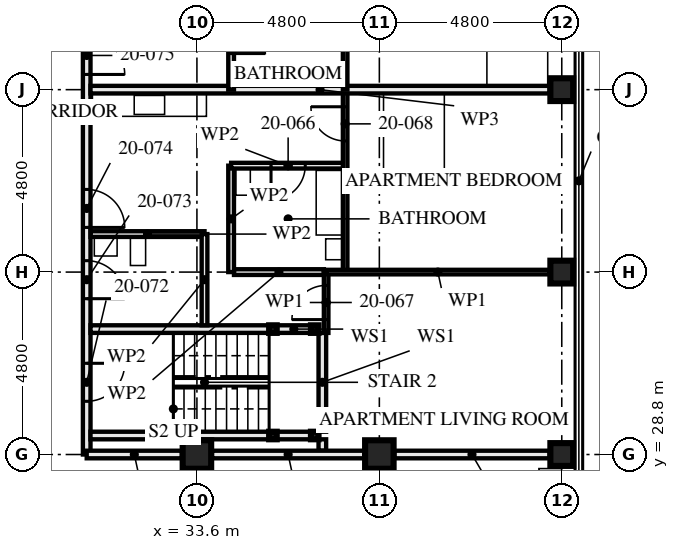
"""IFC4 building model, lengths in metres.
Left out: names, types, materials, properties, quantities, classifications, styles, units other than length and angle.
Written with IfcOpenShell. Run it as: python <this file> out.ifc"""

import sys

from ifc_helpers import new_model, si_unit, direction, frame, frame_2d, origin, origin_2d, place, context, subcontext, project, spatial, rectangle, hollow_rectangle, extrude, element, fill, save


model = new_model("IFC4")
c1 = context("Model", 3, precision=1e-05, world=origin(), true_north=direction((0.0, 1.0)))
c2 = subcontext(c1, "Body", "Model", "MODEL_VIEW")
j1 = project(units=[si_unit("LENGTHUNIT", "METRE"), si_unit("PLANEANGLEUNIT", "RADIAN")], contexts=[c1])
p1 = place(None, origin())
s1 = spatial("IfcSite", under=j1, at=p1, CompositionType="ELEMENT")
p2 = place(p1, origin())
s2 = spatial("IfcBuilding", under=s1, at=p2, CompositionType="ELEMENT")
p3 = place(p2, frame((0.0, 0.0, 76.0)))
s3 = spatial("IfcBuildingStorey", under=s2, at=p3, CompositionType="ELEMENT", Elevation=76.0)
for number, where, z_axis, x_axis in (
    (1, (33.6, 28.8, 0.0), (0.0, 0.0, 1.0), (0.0, 1.0, 0.0)),
    (2, (38.4, 28.8, 0.0), (0.0, 0.0, 1.0), (0.0, 1.0, 0.0)),
):
    element("IfcColumn", number, at=place(p3, frame(where, z_axis=z_axis, x_axis=x_axis)), inside=s3, PredefinedType="COLUMN", context=c2, shape_type="SweptSolid", body=[
        extrude(hollow_rectangle(XDim=0.75, YDim=0.75, WallThickness=0.08, at=origin_2d()), origin(), (0.0, 0.0, 1.0), 3.5),
    ])
for number, where, z_axis, x_axis in (
    (3, (43.2, 28.8, 0.0), (0.0, 0.0, 1.0), (0.0, 1.0, 0.0)),
    (4, (43.2, 33.6, 0.0), (0.0, 0.0, 1.0), (1.0, 0.0, 0.0)),
    (5, (43.2, 38.4, 0.0), (0.0, 0.0, 1.0), (1.0, 0.0, 0.0)),
):
    element("IfcColumn", number, at=place(p3, frame(where, z_axis=z_axis, x_axis=x_axis)), inside=s3, PredefinedType="COLUMN", context=c2, shape_type="SweptSolid", body=[
        extrude(hollow_rectangle(XDim=0.6, YDim=0.6, WallThickness=0.08, at=origin_2d()), origin(), (0.0, 0.0, 1.0), 3.5),
    ])
for number, where, z_axis, x_axis in (
    (6, (36.7, 29.3, 0.0), (0.0, 0.0, 1.0), (1.0, 0.0, 0.0)),
    (7, (36.7, 32.1, 0.0), (0.0, 0.0, 1.0), (1.0, 0.0, 0.0)),
    (8, (35.6, 29.3, 0.0), (0.0, 0.0, 1.0), (1.0, 0.0, 0.0)),
    (9, (35.6, 32.1, 0.0), (0.0, 0.0, 1.0), (1.0, 0.0, 0.0)),
):
    element("IfcColumn", number, at=place(p3, frame(where, z_axis=z_axis, x_axis=x_axis)), inside=s3, PredefinedType="COLUMN", context=c2, shape_type="SweptSolid", body=[
        extrude(hollow_rectangle(XDim=0.2, YDim=0.2, WallThickness=0.008, at=origin_2d()), origin(), (0.0, 0.0, 1.0), 3.25),
    ])
p4 = place(p3, frame((38.4, 26.8, 0.0), z_axis=(0.0, 0.0, 1.0), x_axis=(0.0, 1.0, 0.0)))
e10 = element("IfcWall", 10, at=p4, inside=s3, PredefinedType="PARTITIONING", context=c2, shape_type="SweptSolid", body=[
    extrude(rectangle(XDim=1.605, YDim=0.2, at=frame_2d((0.802, 0.0))), origin(), (0.0, 0.0, 1.0), 3.25),
])
p5 = place(p4, frame((0.55, 0.0, 0.0)))
e11 = element("IfcOpeningElement", 11, at=p5, cuts=e10, PredefinedType="OPENING", context=c2, shape_type="SweptSolid", body=[
    extrude(rectangle(XDim=1.0, YDim=2.1, at=frame_2d((0.5, 1.05))), frame((0.0, 0.111, 0.0), z_axis=(0.0, -1.0, 0.0), x_axis=(1.0, 0.0, 0.0)), (0.0, 0.0, 1.0), 0.221),
])
p6 = place(p3, frame((36.6, 29.3, 0.0), z_axis=(0.0, 0.0, 1.0), x_axis=(-1.0, 0.0, 0.0)))
e12 = element("IfcWall", 12, at=p6, inside=s3, PredefinedType="SOLIDWALL", context=c2, shape_type="SweptSolid", body=[
    extrude(rectangle(XDim=0.9, YDim=0.2, at=frame_2d((0.45, 0.0))), origin(), (0.0, 0.0, 1.0), 2.94),
])
p7 = place(p3, frame((35.5, 29.3, 0.0), z_axis=(0.0, 0.0, 1.0), x_axis=(-1.0, 0.0, 0.0)))
e13 = element("IfcWall", 13, at=p7, inside=s3, PredefinedType="SOLIDWALL", context=c2, shape_type="SweptSolid", body=[
    extrude(rectangle(XDim=4.7, YDim=0.2, at=frame_2d((2.35, 0.0))), origin(), (0.0, 0.0, 1.0), 2.94),
])
p8 = place(p3, frame((36.6, 32.1, 0.0), z_axis=(0.0, 0.0, 1.0), x_axis=(-1.0, 0.0, 0.0)))
e14 = element("IfcWall", 14, at=p8, inside=s3, PredefinedType="SOLIDWALL", context=c2, shape_type="SweptSolid", body=[
    extrude(rectangle(XDim=0.9, YDim=0.2, at=frame_2d((0.45, 0.0))), origin(), (0.0, 0.0, 1.0), 2.94),
])
p9 = place(p3, frame((35.5, 32.1, 0.0), z_axis=(0.0, 0.0, 1.0), x_axis=(-1.0, 0.0, 0.0)))
e15 = element("IfcWall", 15, at=p9, inside=s3, PredefinedType="SOLIDWALL", context=c2, shape_type="SweptSolid", body=[
    extrude(rectangle(XDim=4.7, YDim=0.2, at=frame_2d((2.35, 0.0))), origin(), (0.0, 0.0, 1.0), 2.94),
])
p10 = place(p3, frame((36.9, 28.9, 0.0), z_axis=(0.0, 0.0, 1.0), x_axis=(0.0, 1.0, 0.0)))
e16 = element("IfcWall", 16, at=p10, inside=s3, PredefinedType="SOLIDWALL", context=c2, shape_type="SweptSolid", body=[
    extrude(rectangle(XDim=0.3, YDim=0.2, at=frame_2d((0.15, 0.0))), origin(), (0.0, 0.0, 1.0), 3.25),
])
p11 = place(p3, frame((36.9, 29.4, 0.0), z_axis=(0.0, 0.0, 1.0), x_axis=(0.0, 1.0, 0.0)))
e17 = element("IfcWall", 17, at=p11, inside=s3, PredefinedType="SOLIDWALL", context=c2, shape_type="SweptSolid", body=[
    extrude(rectangle(XDim=2.6, YDim=0.2, at=frame_2d((1.3, 0.0))), origin(), (0.0, 0.0, 1.0), 3.25),
])
p12 = place(p3, frame((33.8, 32.2, 0.0), z_axis=(0.0, 0.0, 1.0), x_axis=(0.0, 1.0, 0.0)))
e18 = element("IfcWall", 18, at=p12, inside=s3, PredefinedType="PARTITIONING", context=c2, shape_type="SweptSolid", body=[
    extrude(rectangle(XDim=2.4, YDim=0.15, at=frame_2d((1.2, 0.0))), origin(), (0.0, 0.0, 1.0), 2.04),
])
p13 = place(p3, frame((33.8, 34.6, 0.0), z_axis=(0.0, 0.0, 1.0), x_axis=(-1.0, 0.0, 0.0)))
e19 = element("IfcWall", 19, at=p13, inside=s3, PredefinedType="PARTITIONING", context=c2, shape_type="SweptSolid", body=[
    extrude(rectangle(XDim=3.0, YDim=0.15, at=frame_2d((1.5, 0.0))), origin(), (0.0, 0.0, 1.0), 3.25),
])
p14 = place(p3, frame((37.5, 36.4, 0.0), z_axis=(0.0, 0.0, 1.0), x_axis=(-1.0, 0.0, 0.0)))
e20 = element("IfcWall", 20, at=p14, inside=s3, PredefinedType="PARTITIONING", context=c2, shape_type="SweptSolid", body=[
    extrude(rectangle(XDim=3.0, YDim=0.15, at=frame_2d((1.5, 0.0))), origin(), (0.0, 0.0, 1.0), 3.25),
])
p15 = place(p14, frame((1.05, 0.0, 0.0)))
e21 = element("IfcOpeningElement", 21, at=p15, cuts=e20, PredefinedType="OPENING", context=c2, shape_type="SweptSolid", body=[
    extrude(rectangle(XDim=0.9, YDim=2.1, at=frame_2d((0.45, 1.05))), frame((0.0, 0.085, 0.0), z_axis=(0.0, -1.0, 0.0), x_axis=(1.0, 0.0, 0.0)), (0.0, 0.0, 1.0), 0.171),
])
p16 = place(p3, frame((34.5, 33.6, 0.0), z_axis=(0.0, 0.0, 1.0), x_axis=(0.0, 1.0, 0.0)))
e22 = element("IfcWall", 22, at=p16, inside=s3, PredefinedType="PARTITIONING", context=c2, shape_type="SweptSolid", body=[
    extrude(rectangle(XDim=2.8, YDim=0.15, at=frame_2d((1.4, 0.0))), origin(), (0.0, 0.0, 1.0), 3.25),
])
p17 = place(p3, frame((37.0, 32.0, 0.0), z_axis=(0.0, 0.0, 1.0), x_axis=(0.0, 1.0, 0.0)))
e23 = element("IfcWall", 23, at=p17, inside=s3, PredefinedType="PARTITIONING", context=c2, shape_type="SweptSolid", body=[
    extrude(rectangle(XDim=1.6, YDim=0.12, at=frame_2d((0.8, 0.0))), origin(), (0.0, 0.0, 1.0), 3.25),
])
p18 = place(p17, frame((0.35, 0.0, 0.0)))
e24 = element("IfcOpeningElement", 24, at=p18, cuts=e23, PredefinedType="OPENING", context=c2, shape_type="SweptSolid", body=[
    extrude(rectangle(XDim=0.9, YDim=2.1, at=frame_2d((0.45, 1.05))), frame((0.0, 0.071, 0.0), z_axis=(0.0, -1.0, 0.0), x_axis=(1.0, 0.0, 0.0)), (0.0, 0.0, 1.0), 0.141),
])
p19 = place(p3, frame((37.5, 33.6, 0.0), z_axis=(0.0, 0.0, 1.0), x_axis=(0.0, 1.0, 0.0)))
e25 = element("IfcWall", 25, at=p19, inside=s3, PredefinedType="PARTITIONING", context=c2, shape_type="SweptSolid", body=[
    extrude(rectangle(XDim=4.8, YDim=0.12, at=frame_2d((2.4, 0.0))), origin(), (0.0, 0.0, 1.0), 3.25),
])
p20 = place(p19, frame((3.45, 0.0, 0.0)))
e26 = element("IfcOpeningElement", 26, at=p20, cuts=e25, PredefinedType="OPENING", context=c2, shape_type="SweptSolid", body=[
    extrude(rectangle(XDim=0.9, YDim=2.1, at=frame_2d((0.45, 1.05))), frame((0.0, 0.071, 0.0), z_axis=(0.0, -1.0, 0.0), x_axis=(1.0, 0.0, 0.0)), (0.0, 0.0, 1.0), 0.141),
])
p21 = place(p3, frame((42.88, 33.6, 0.0), z_axis=(0.0, 0.0, 1.0), x_axis=(-1.0, 0.0, 0.0)))
e27 = element("IfcWall", 27, at=p21, inside=s3, PredefinedType="PARTITIONING", context=c2, shape_type="SweptSolid", body=[
    extrude(rectangle(XDim=5.88, YDim=0.12, at=frame_2d((2.94, 0.0))), origin(), (0.0, 0.0, 1.0), 2.04),
])
p22 = place(p3, frame((42.88, 38.4, 0.0), z_axis=(0.0, 0.0, 1.0), x_axis=(-1.0, 0.0, 0.0)))
e28 = element("IfcWall", 28, at=p22, inside=s3, PredefinedType="PARTITIONING", context=c2, shape_type="SweptSolid", body=[
    extrude(rectangle(XDim=12.08, YDim=0.2, at=frame_2d((6.04, 0.0))), origin(), (0.0, 0.0, 1.0), 2.04),
])
p23 = place(p3, frame((34.5, 38.4, 0.0), z_axis=(0.0, 0.0, 1.0), x_axis=(0.0, 1.0, 0.0)))
e29 = element("IfcWall", 29, at=p23, inside=s3, PredefinedType="PARTITIONING", context=c2, shape_type="SweptSolid", body=[
    extrude(rectangle(XDim=2.8, YDim=0.15, at=frame_2d((1.4, 0.0))), origin(), (0.0, 0.0, 1.0), 3.25),
])
p24 = place(p23, frame((0.95, 0.0, 0.0)))
e30 = element("IfcOpeningElement", 30, at=p24, cuts=e29, PredefinedType="OPENING", context=c2, shape_type="SweptSolid", body=[
    extrude(rectangle(XDim=0.9, YDim=2.1, at=frame_2d((0.45, 1.05))), frame((0.0, 0.085, 0.0), z_axis=(0.0, -1.0, 0.0), x_axis=(1.0, 0.0, 0.0)), (0.0, 0.0, 1.0), 0.171),
])
p25 = place(p3, frame((37.5, 38.4, 0.0), z_axis=(0.0, 0.0, 1.0), x_axis=(0.0, 1.0, 0.0)))
e31 = element("IfcWall", 31, at=p25, inside=s3, PredefinedType="PARTITIONING", context=c2, shape_type="SweptSolid", body=[
    extrude(rectangle(XDim=4.8, YDim=0.12, at=frame_2d((2.4, 0.0))), origin(), (0.0, 0.0, 1.0), 3.25),
])
p26 = place(p25, frame((3.45, 0.0, 0.0)))
e32 = element("IfcOpeningElement", 32, at=p26, cuts=e31, PredefinedType="OPENING", context=c2, shape_type="SweptSolid", body=[
    extrude(rectangle(XDim=0.9, YDim=2.1, at=frame_2d((0.45, 1.05))), frame((0.0, 0.071, 0.0), z_axis=(0.0, -1.0, 0.0), x_axis=(1.0, 0.0, 0.0)), (0.0, 0.0, 1.0), 0.141),
])
p27 = place(p3, frame((30.7, 28.8, 0.0), z_axis=(0.0, 0.0, 1.0), x_axis=(0.0, 1.0, 0.0)))
e33 = element("IfcWall", 33, at=p27, inside=s3, PredefinedType="PARTITIONING", context=c2, shape_type="SweptSolid", body=[
    extrude(rectangle(XDim=14.4, YDim=0.2, at=frame_2d((7.2, 0.0))), origin(), (0.0, 0.0, 1.0), 2.04),
])
p28 = place(p27, frame((1.4, 0.0, 0.0)))
e34 = element("IfcOpeningElement", 34, at=p28, cuts=e33, PredefinedType="OPENING", context=c2, shape_type="SweptSolid", body=[
    extrude(rectangle(XDim=1.0, YDim=2.0, at=frame_2d((0.5, 1.0))), frame((0.0, 0.111, 0.0), z_axis=(0.0, -1.0, 0.0), x_axis=(1.0, 0.0, 0.0)), (0.0, 0.0, 1.0), 0.221),
])
p29 = place(p27, frame((4.1, 0.0, 0.0)))
e35 = element("IfcOpeningElement", 35, at=p29, cuts=e33, PredefinedType="OPENING", context=c2, shape_type="SweptSolid", body=[
    extrude(rectangle(XDim=1.0, YDim=2.0, at=frame_2d((0.5, 1.0))), frame((0.0, 0.111, 0.0), z_axis=(0.0, -1.0, 0.0), x_axis=(1.0, 0.0, 0.0)), (0.0, 0.0, 1.0), 0.221),
])
p30 = place(p27, frame((5.975, 0.0, 0.0)))
e36 = element("IfcOpeningElement", 36, at=p30, cuts=e33, PredefinedType="OPENING", context=c2, shape_type="SweptSolid", body=[
    extrude(rectangle(XDim=1.0, YDim=2.0, at=frame_2d((0.5, 1.0))), frame((0.0, 0.111, 0.0), z_axis=(0.0, -1.0, 0.0), x_axis=(1.0, 0.0, 0.0)), (0.0, 0.0, 1.0), 0.221),
])
p31 = place(p27, frame((10.0, 0.0, 0.0)))
e37 = element("IfcOpeningElement", 37, at=p31, cuts=e33, PredefinedType="OPENING", context=c2, shape_type="SweptSolid", body=[
    extrude(rectangle(XDim=1.0, YDim=2.0, at=frame_2d((0.5, 1.0))), frame((0.0, 0.111, 0.0), z_axis=(0.0, -1.0, 0.0), x_axis=(1.0, 0.0, 0.0)), (0.0, 0.0, 1.0), 0.221),
])
p32 = place(p3, frame((42.88, 28.8, 0.0), z_axis=(0.0, 0.0, 1.0), x_axis=(-1.0, 0.0, 0.0)))
e38 = element("IfcWall", 38, at=p32, inside=s3, PredefinedType="PARTITIONING", context=c2, shape_type="SweptSolid", body=[
    extrude(rectangle(XDim=4.085, YDim=0.2, at=frame_2d((2.042, 0.0))), origin(), (0.0, 0.0, 1.0), 2.04),
])
p33 = place(p3, frame((38.005, 28.8, 0.0), z_axis=(0.0, 0.0, 1.0), x_axis=(-1.0, 0.0, 0.0)))
e39 = element("IfcWall", 39, at=p33, inside=s3, PredefinedType="PARTITIONING", context=c2, shape_type="SweptSolid", body=[
    extrude(rectangle(XDim=4.01, YDim=0.2, at=frame_2d((2.005, 0.0))), origin(), (0.0, 0.0, 1.0), 2.04),
])
p34 = place(p3, frame((33.205, 28.8, 0.0), z_axis=(0.0, 0.0, 1.0), x_axis=(-1.0, 0.0, 0.0)))
e40 = element("IfcWall", 40, at=p34, inside=s3, PredefinedType="PARTITIONING", context=c2, shape_type="SweptSolid", body=[
    extrude(rectangle(XDim=2.505, YDim=0.2, at=frame_2d((1.252, 0.0))), origin(), (0.0, 0.0, 1.0), 2.04),
])
p35 = place(p3, frame((36.94, 33.6, 0.0), z_axis=(0.0, 0.0, 1.0), x_axis=(-1.0, 0.0, 0.0)))
e41 = element("IfcWall", 41, at=p35, inside=s3, PredefinedType="PARTITIONING", context=c2, shape_type="SweptSolid", body=[
    extrude(rectangle(XDim=2.365, YDim=0.15, at=frame_2d((1.183, 0.0))), origin(), (0.0, 0.0, 1.0), 2.04),
])
p36 = place(p15, origin())
e42 = element("IfcDoor", 42, at=p36, inside=s3, OperationType="SINGLE_SWING_LEFT", PredefinedType="DOOR", context=c2, shape_type="SweptSolid", body=[
    extrude(rectangle(XDim=0.9, YDim=2.1, at=frame_2d((0.45, 1.05))), frame((0.0, 0.022, 0.0), z_axis=(0.0, -1.0, 0.0), x_axis=(1.0, 0.0, 0.0)), (0.0, 0.0, 1.0), 0.044),
])
fill(e21, e42)
p37 = place(p18, origin())
e43 = element("IfcDoor", 43, at=p37, inside=s3, OperationType="SINGLE_SWING_RIGHT", PredefinedType="DOOR", context=c2, shape_type="SweptSolid", body=[
    extrude(rectangle(XDim=0.9, YDim=2.1, at=frame_2d((0.45, 1.05))), frame((0.0, 0.022, 0.0), z_axis=(0.0, -1.0, 0.0), x_axis=(1.0, 0.0, 0.0)), (0.0, 0.0, 1.0), 0.044),
])
fill(e24, e43)
p38 = place(p20, origin())
e44 = element("IfcDoor", 44, at=p38, inside=s3, OperationType="SINGLE_SWING_LEFT", PredefinedType="DOOR", context=c2, shape_type="SweptSolid", body=[
    extrude(rectangle(XDim=0.9, YDim=2.1, at=frame_2d((0.45, 1.05))), frame((0.0, 0.022, 0.0), z_axis=(0.0, -1.0, 0.0), x_axis=(1.0, 0.0, 0.0)), (0.0, 0.0, 1.0), 0.044),
])
fill(e26, e44)
p39 = place(p24, frame((0.9, 0.0, 0.0), z_axis=(0.0, 0.0, 1.0), x_axis=(-1.0, 0.0, 0.0)))
e45 = element("IfcDoor", 45, at=p39, inside=s3, OperationType="SINGLE_SWING_LEFT", PredefinedType="DOOR", context=c2, shape_type="SweptSolid", body=[
    extrude(rectangle(XDim=0.9, YDim=2.1, at=frame_2d((0.45, 1.05))), frame((0.0, 0.022, 0.0), z_axis=(0.0, -1.0, 0.0), x_axis=(1.0, 0.0, 0.0)), (0.0, 0.0, 1.0), 0.044),
])
fill(e30, e45)
p40 = place(p28, frame((1.0, 0.0, 0.0), z_axis=(0.0, 0.0, 1.0), x_axis=(-1.0, 0.0, 0.0)))
e46 = element("IfcDoor", 46, at=p40, inside=s3, OperationType="SINGLE_SWING_RIGHT", PredefinedType="DOOR", context=c2, shape_type="SweptSolid", body=[
    extrude(rectangle(XDim=1.0, YDim=2.0, at=frame_2d((0.5, 1.0))), frame((0.0, 0.032, 0.0), z_axis=(0.0, -1.0, 0.0), x_axis=(1.0, 0.0, 0.0)), (0.0, 0.0, 1.0), 0.064),
])
fill(e34, e46)
p41 = place(p29, frame((1.0, 0.0, 0.0), z_axis=(0.0, 0.0, 1.0), x_axis=(-1.0, 0.0, 0.0)))
e47 = element("IfcDoor", 47, at=p41, inside=s3, OperationType="SINGLE_SWING_LEFT", PredefinedType="DOOR", context=c2, shape_type="SweptSolid", body=[
    extrude(rectangle(XDim=1.0, YDim=2.0, at=frame_2d((0.5, 1.0))), frame((0.0, 0.027, 0.0), z_axis=(0.0, -1.0, 0.0), x_axis=(1.0, 0.0, 0.0)), (0.0, 0.0, 1.0), 0.054),
])
fill(e35, e47)
p42 = place(p30, frame((1.0, 0.0, 0.0), z_axis=(0.0, 0.0, 1.0), x_axis=(-1.0, 0.0, 0.0)))
e48 = element("IfcDoor", 48, at=p42, inside=s3, OperationType="SINGLE_SWING_LEFT", PredefinedType="DOOR", context=c2, shape_type="SweptSolid", body=[
    extrude(rectangle(XDim=1.0, YDim=2.0, at=frame_2d((0.5, 1.0))), frame((0.0, 0.027, 0.0), z_axis=(0.0, -1.0, 0.0), x_axis=(1.0, 0.0, 0.0)), (0.0, 0.0, 1.0), 0.054),
])
fill(e36, e48)
p43 = place(p31, frame((1.0, 0.0, 0.0), z_axis=(0.0, 0.0, 1.0), x_axis=(-1.0, 0.0, 0.0)))
e49 = element("IfcDoor", 49, at=p43, inside=s3, OperationType="SINGLE_SWING_LEFT", PredefinedType="DOOR", context=c2, shape_type="SweptSolid", body=[
    extrude(rectangle(XDim=1.0, YDim=2.0, at=frame_2d((0.5, 1.0))), frame((0.0, 0.027, 0.0), z_axis=(0.0, -1.0, 0.0), x_axis=(1.0, 0.0, 0.0)), (0.0, 0.0, 1.0), 0.054),
])
fill(e37, e49)
save(model, sys.argv[1])
